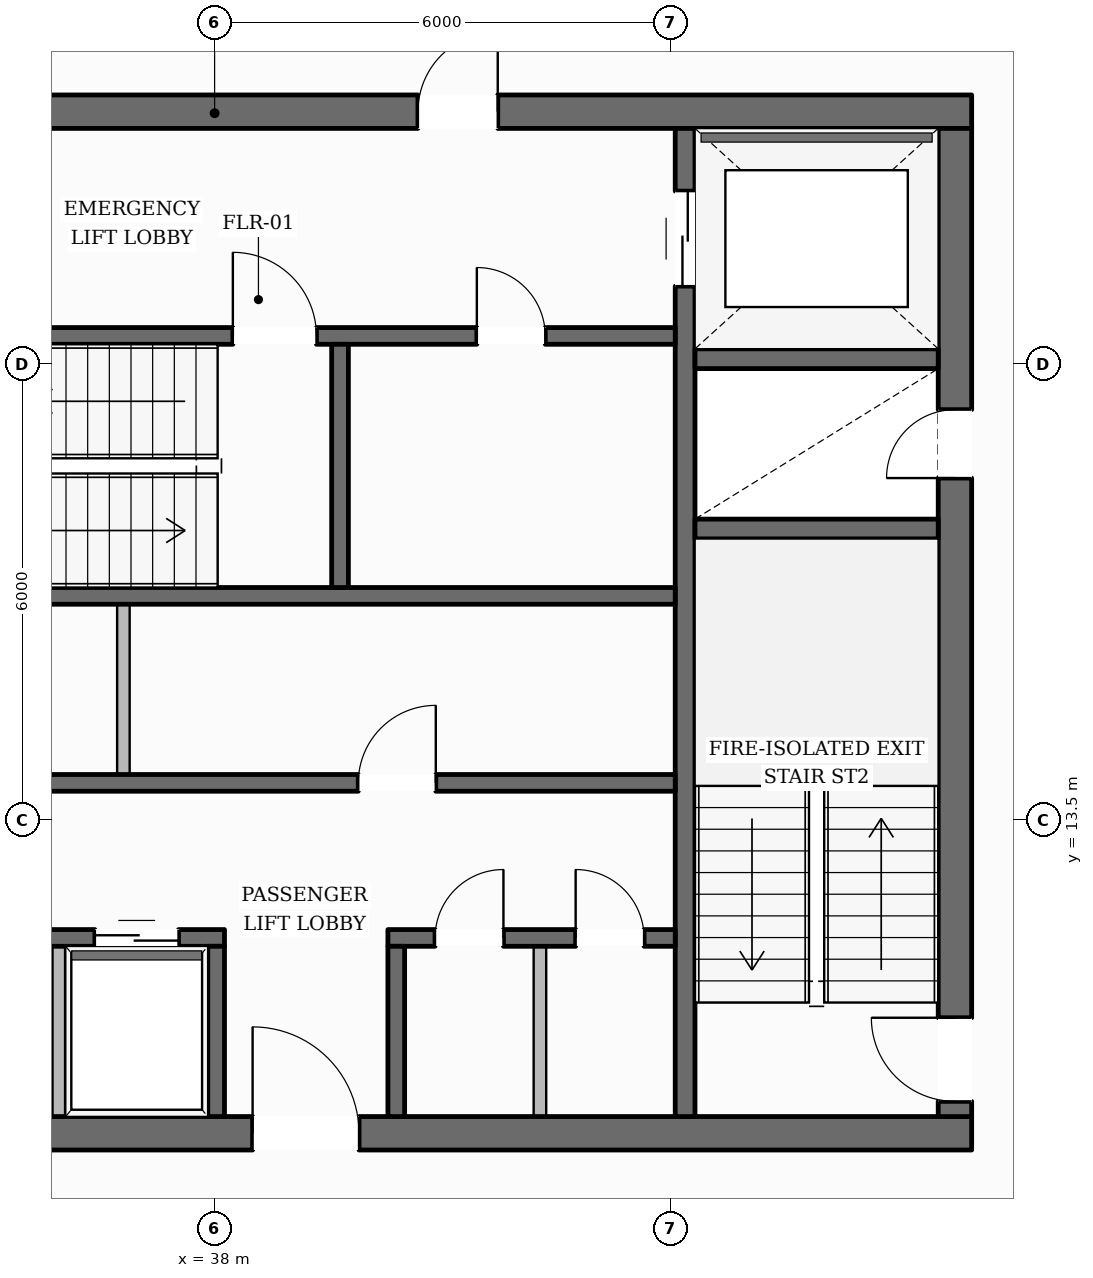
"""IFC4 building model, lengths in metres.
Left out: names, types, materials, properties, quantities, classifications, styles, units other than length and angle.
Written with IfcOpenShell. Run it as: python <this file> out.ifc"""

import sys

from ifc_helpers import new_model, si_unit, direction, frame, frame_2d, origin, place, context, subcontext, project, spatial, rectangle, extrude, element, fill, save


model = new_model("IFC4")
c1 = context("Model", 3, precision=1e-05, world=origin(), true_north=direction((0.0, 1.0)))
c2 = subcontext(c1, "Body", "Model", "MODEL_VIEW")
j1 = project(units=[si_unit("LENGTHUNIT", "METRE"), si_unit("PLANEANGLEUNIT", "RADIAN")], contexts=[c1])
p1 = place(None, origin())
s1 = spatial("IfcSite", under=j1, at=p1, CompositionType="ELEMENT")
p2 = place(p1, origin())
s2 = spatial("IfcBuilding", under=s1, at=p2, CompositionType="ELEMENT")
p3 = place(p2, frame((0.0, 0.0, 168.85)))
s3 = spatial("IfcBuildingStorey", under=s2, at=p3, CompositionType="ELEMENT", Elevation=168.85)
p4 = place(p3, frame((28.04, 9.38, 0.0), z_axis=(0.0, 0.0, 1.0), x_axis=(1.0, 0.0, 0.0)))
e1 = element("IfcWall", 1, at=p4, inside=s3, PredefinedType="SOLIDWALL", context=c2, shape_type="SweptSolid", body=[
    extrude(rectangle(XDim=19.92, YDim=0.44, at=frame_2d((9.96, 0.0))), origin(), (0.0, 0.0, 1.0), 3.6),
])
p5 = place(p4, frame((10.46, 0.0, 0.0)))
e2 = element("IfcOpeningElement", 2, at=p5, cuts=e1, PredefinedType="OPENING", context=c2, shape_type="SweptSolid", body=[
    extrude(rectangle(XDim=1.4, YDim=2.2, at=frame_2d((0.7, 1.1))), frame((0.0, 0.23, 0.0), z_axis=(0.0, -1.0, 0.0), x_axis=(1.0, 0.0, 0.0)), (0.0, 0.0, 1.0), 0.46),
])
p6 = place(p3, frame((28.04, 22.82, 0.0), z_axis=(0.0, 0.0, 1.0), x_axis=(1.0, 0.0, 0.0)))
e3 = element("IfcWall", 3, at=p6, inside=s3, PredefinedType="SOLIDWALL", context=c2, shape_type="SweptSolid", body=[
    extrude(rectangle(XDim=19.92, YDim=0.44, at=frame_2d((9.96, 0.0))), origin(), (0.0, 0.0, 1.0), 3.6),
])
p7 = place(p6, frame((6.235, 0.0, 0.0)))
e4 = element("IfcOpeningElement", 4, at=p7, cuts=e3, PredefinedType="OPENING", context=c2, shape_type="SweptSolid", body=[
    extrude(rectangle(XDim=1.05, YDim=2.15, at=frame_2d((0.525, 1.075))), frame((0.0, 0.23, 0.0), z_axis=(0.0, -1.0, 0.0), x_axis=(1.0, 0.0, 0.0)), (0.0, 0.0, 1.0), 0.46),
])
p8 = place(p6, frame((12.635, 0.0, 0.0)))
e5 = element("IfcOpeningElement", 5, at=p8, cuts=e3, PredefinedType="OPENING", context=c2, shape_type="SweptSolid", body=[
    extrude(rectangle(XDim=1.05, YDim=2.15, at=frame_2d((0.525, 1.075))), frame((0.0, 0.23, 0.0), z_axis=(0.0, -1.0, 0.0), x_axis=(1.0, 0.0, 0.0)), (0.0, 0.0, 1.0), 0.46),
])
p9 = place(p3, frame((47.74, 9.6, 0.0), z_axis=(0.0, 0.0, 1.0), x_axis=(0.0, 1.0, 0.0)))
e6 = element("IfcWall", 6, at=p9, inside=s3, PredefinedType="SOLIDWALL", context=c2, shape_type="SweptSolid", body=[
    extrude(rectangle(XDim=13.0, YDim=0.44, at=frame_2d((6.5, 0.0))), origin(), (0.0, 0.0, 1.0), 3.6),
])
p10 = place(p9, frame((0.2, 0.0, 0.0)))
e7 = element("IfcOpeningElement", 7, at=p10, cuts=e6, PredefinedType="OPENING", context=c2, shape_type="SweptSolid", body=[
    extrude(rectangle(XDim=1.1, YDim=2.15, at=frame_2d((0.55, 1.075))), frame((0.0, 0.23, 0.0), z_axis=(0.0, -1.0, 0.0), x_axis=(1.0, 0.0, 0.0)), (0.0, 0.0, 1.0), 0.46),
])
p11 = place(p9, frame((8.4, 0.0, 0.0)))
e8 = element("IfcOpeningElement", 8, at=p11, cuts=e6, PredefinedType="OPENING", context=c2, shape_type="SweptSolid", body=[
    extrude(rectangle(XDim=0.9, YDim=2.1, at=frame_2d((0.45, 1.05))), frame((0.0, 0.23, 0.0), z_axis=(0.0, -1.0, 0.0), x_axis=(1.0, 0.0, 0.0)), (0.0, 0.0, 1.0), 0.46),
])
p12 = place(p3, frame((44.19, 9.6, 0.0), z_axis=(0.0, 0.0, 1.0), x_axis=(0.0, 1.0, 0.0)))
e9 = element("IfcWall", 9, at=p12, inside=s3, PredefinedType="SHEAR", context=c2, shape_type="SweptSolid", body=[
    extrude(rectangle(XDim=13.0, YDim=0.26, at=frame_2d((6.5, 0.0))), origin(), (0.0, 0.0, 1.0), 3.6),
])
p13 = place(p12, frame((10.925, 0.0, 0.0)))
e10 = element("IfcOpeningElement", 10, at=p13, cuts=e9, PredefinedType="OPENING", context=c2, shape_type="SweptSolid", body=[
    extrude(rectangle(XDim=1.25, YDim=2.25, at=frame_2d((0.625, 1.125))), frame((0.0, 0.14, 0.0), z_axis=(0.0, -1.0, 0.0), x_axis=(1.0, 0.0, 0.0)), (0.0, 0.0, 1.0), 0.28),
])
for number, where, z_axis, x_axis in (
    (11, (44.32, 17.33, 0.0), (0.0, 0.0, 1.0), (1.0, 0.0, 0.0)),
    (12, (44.32, 19.57, 0.0), (0.0, 0.0, 1.0), (1.0, 0.0, 0.0)),
):
    element("IfcWall", number, at=place(p3, frame(where, z_axis=z_axis, x_axis=x_axis)), inside=s3, PredefinedType="SHEAR", context=c2, shape_type="SweptSolid", body=[
        extrude(rectangle(XDim=3.2, YDim=0.26, at=frame_2d((1.6, 0.0))), origin(), (0.0, 0.0, 1.0), 3.6),
    ])
p14 = place(p3, frame((31.94, 19.87, 0.0), z_axis=(0.0, 0.0, 1.0), x_axis=(1.0, 0.0, 0.0)))
e13 = element("IfcWall", 13, at=p14, inside=s3, PredefinedType="SOLIDWALL", context=c2, shape_type="SweptSolid", body=[
    extrude(rectangle(XDim=12.12, YDim=0.22, at=frame_2d((6.06, 0.0))), origin(), (0.0, 0.0, 1.0), 3.6),
])
p15 = place(p14, frame((6.3, 0.0, 0.0)))
e14 = element("IfcOpeningElement", 14, at=p15, cuts=e13, PredefinedType="OPENING", context=c2, shape_type="SweptSolid", body=[
    extrude(rectangle(XDim=1.1, YDim=2.15, at=frame_2d((0.55, 1.075))), frame((0.0, 0.12, 0.0), z_axis=(0.0, -1.0, 0.0), x_axis=(1.0, 0.0, 0.0)), (0.0, 0.0, 1.0), 0.24),
])
p16 = place(p14, frame((9.51, 0.0, 0.0)))
e15 = element("IfcOpeningElement", 15, at=p16, cuts=e13, PredefinedType="OPENING", context=c2, shape_type="SweptSolid", body=[
    extrude(rectangle(XDim=0.9, YDim=2.1, at=frame_2d((0.45, 1.05))), frame((0.0, 0.12, 0.0), z_axis=(0.0, -1.0, 0.0), x_axis=(1.0, 0.0, 0.0)), (0.0, 0.0, 1.0), 0.24),
])
p17 = place(p3, frame((31.94, 16.45, 0.0), z_axis=(0.0, 0.0, 1.0), x_axis=(1.0, 0.0, 0.0)))
e16 = element("IfcWall", 16, at=p17, inside=s3, PredefinedType="SOLIDWALL", context=c2, shape_type="SweptSolid", body=[
    extrude(rectangle(XDim=12.12, YDim=0.22, at=frame_2d((6.06, 0.0))), origin(), (0.0, 0.0, 1.0), 3.6),
])
p18 = place(p3, frame((39.65, 16.56, 0.0), z_axis=(0.0, 0.0, 1.0), x_axis=(0.0, 1.0, 0.0)))
e17 = element("IfcWall", 17, at=p18, inside=s3, PredefinedType="SOLIDWALL", context=c2, shape_type="SweptSolid", body=[
    extrude(rectangle(XDim=3.2, YDim=0.22, at=frame_2d((1.6, 0.0))), origin(), (0.0, 0.0, 1.0), 3.6),
])
p19 = place(p3, frame((31.94, 13.99, 0.0), z_axis=(0.0, 0.0, 1.0), x_axis=(1.0, 0.0, 0.0)))
e18 = element("IfcWall", 18, at=p19, inside=s3, PredefinedType="SOLIDWALL", context=c2, shape_type="SweptSolid", body=[
    extrude(rectangle(XDim=12.12, YDim=0.22, at=frame_2d((6.06, 0.0))), origin(), (0.0, 0.0, 1.0), 3.6),
])
p20 = place(p19, frame((1.91, 0.0, 0.0)))
e19 = element("IfcOpeningElement", 19, at=p20, cuts=e18, PredefinedType="OPENING", context=c2, shape_type="SweptSolid", body=[
    extrude(rectangle(XDim=0.9, YDim=2.1, at=frame_2d((0.45, 1.05))), frame((0.0, 0.12, 0.0), z_axis=(0.0, -1.0, 0.0), x_axis=(1.0, 0.0, 0.0)), (0.0, 0.0, 1.0), 0.24),
])
p21 = place(p19, frame((7.95, 0.0, 0.0)))
e20 = element("IfcOpeningElement", 20, at=p21, cuts=e18, PredefinedType="OPENING", context=c2, shape_type="SweptSolid", body=[
    extrude(rectangle(XDim=1.02, YDim=2.15, at=frame_2d((0.51, 1.075))), frame((0.0, 0.12, 0.0), z_axis=(0.0, -1.0, 0.0), x_axis=(1.0, 0.0, 0.0)), (0.0, 0.0, 1.0), 0.24),
])
p22 = place(p3, frame((31.94, 11.95, 0.0), z_axis=(0.0, 0.0, 1.0), x_axis=(1.0, 0.0, 0.0)))
e21 = element("IfcWall", 21, at=p22, inside=s3, PredefinedType="SOLIDWALL", context=c2, shape_type="SweptSolid", body=[
    extrude(rectangle(XDim=6.19, YDim=0.22, at=frame_2d((3.095, 0.0))), origin(), (0.0, 0.0, 1.0), 3.6),
])
p23 = place(p22, frame((0.385, 0.0, 0.0)))
e22 = element("IfcOpeningElement", 22, at=p23, cuts=e21, PredefinedType="OPENING", context=c2, shape_type="SweptSolid", body=[
    extrude(rectangle(XDim=1.1, YDim=2.2, at=frame_2d((0.55, 1.1))), frame((0.0, 0.12, 0.0), z_axis=(0.0, -1.0, 0.0), x_axis=(1.0, 0.0, 0.0)), (0.0, 0.0, 1.0), 0.24),
])
p24 = place(p22, frame((2.435, 0.0, 0.0)))
e23 = element("IfcOpeningElement", 23, at=p24, cuts=e21, PredefinedType="OPENING", context=c2, shape_type="SweptSolid", body=[
    extrude(rectangle(XDim=1.1, YDim=2.2, at=frame_2d((0.55, 1.1))), frame((0.0, 0.12, 0.0), z_axis=(0.0, -1.0, 0.0), x_axis=(1.0, 0.0, 0.0)), (0.0, 0.0, 1.0), 0.24),
])
p25 = place(p22, frame((4.485, 0.0, 0.0)))
e24 = element("IfcOpeningElement", 24, at=p25, cuts=e21, PredefinedType="OPENING", context=c2, shape_type="SweptSolid", body=[
    extrude(rectangle(XDim=1.1, YDim=2.2, at=frame_2d((0.55, 1.1))), frame((0.0, 0.12, 0.0), z_axis=(0.0, -1.0, 0.0), x_axis=(1.0, 0.0, 0.0)), (0.0, 0.0, 1.0), 0.24),
])
p26 = place(p3, frame((40.28, 11.95, 0.0), z_axis=(0.0, 0.0, 1.0), x_axis=(1.0, 0.0, 0.0)))
e25 = element("IfcWall", 25, at=p26, inside=s3, PredefinedType="SOLIDWALL", context=c2, shape_type="SweptSolid", body=[
    extrude(rectangle(XDim=3.78, YDim=0.22, at=frame_2d((1.89, 0.0))), origin(), (0.0, 0.0, 1.0), 3.6),
])
p27 = place(p26, frame((0.62, 0.0, 0.0)))
e26 = element("IfcOpeningElement", 26, at=p27, cuts=e25, PredefinedType="OPENING", context=c2, shape_type="SweptSolid", body=[
    extrude(rectangle(XDim=0.9, YDim=2.1, at=frame_2d((0.45, 1.05))), frame((0.0, 0.12, 0.0), z_axis=(0.0, -1.0, 0.0), x_axis=(1.0, 0.0, 0.0)), (0.0, 0.0, 1.0), 0.24),
])
p28 = place(p26, frame((2.47, 0.0, 0.0)))
e27 = element("IfcOpeningElement", 27, at=p28, cuts=e25, PredefinedType="OPENING", context=c2, shape_type="SweptSolid", body=[
    extrude(rectangle(XDim=0.9, YDim=2.1, at=frame_2d((0.45, 1.05))), frame((0.0, 0.12, 0.0), z_axis=(0.0, -1.0, 0.0), x_axis=(1.0, 0.0, 0.0)), (0.0, 0.0, 1.0), 0.24),
])
for number, where, z_axis, x_axis in (
    (28, (38.02, 9.6, 0.0), (0.0, 0.0, 1.0), (0.0, 1.0, 0.0)),
    (29, (40.39, 9.6, 0.0), (0.0, 0.0, 1.0), (0.0, 1.0, 0.0)),
):
    element("IfcWall", number, at=place(p3, frame(where, z_axis=z_axis, x_axis=x_axis)), inside=s3, PredefinedType="SOLIDWALL", context=c2, shape_type="SweptSolid", body=[
        extrude(rectangle(XDim=2.24, YDim=0.22, at=frame_2d((1.12, 0.0))), origin(), (0.0, 0.0, 1.0), 3.6),
    ])
p29 = place(p3, frame((42.696, 44.593, 0.0), z_axis=(0.0, 0.0, 1.0), x_axis=(0.495321099056, -0.868709968188, 0.0)))
e30 = element("IfcWall", 30, at=p29, inside=s3, PredefinedType="STANDARD", context=c2, shape_type="SweptSolid", body=[
    extrude(rectangle(XDim=37.366, YDim=0.35, at=frame_2d((18.683, 0.0))), origin(), (0.0, 0.0, 1.0), 3.132),
])
p30 = place(p29, frame((33.134, 0.0, 0.65)))
e31 = element("IfcOpeningElement", 31, at=p30, cuts=e30, PredefinedType="OPENING", context=c2, shape_type="SweptSolid", body=[
    extrude(rectangle(XDim=1.45, YDim=1.75, at=frame_2d((0.725, 0.875))), frame((0.0, 0.185, 0.0), z_axis=(0.0, -1.0, 0.0), x_axis=(1.0, 0.0, 0.0)), (0.0, 0.0, 1.0), 0.37),
])
p31 = place(p29, frame((27.065, 0.0, 0.65)))
e32 = element("IfcOpeningElement", 32, at=p31, cuts=e30, PredefinedType="OPENING", context=c2, shape_type="SweptSolid", body=[
    extrude(rectangle(XDim=1.45, YDim=1.75, at=frame_2d((0.725, 0.875))), frame((0.0, 0.185, 0.0), z_axis=(0.0, -1.0, 0.0), x_axis=(1.0, 0.0, 0.0)), (0.0, 0.0, 1.0), 0.37),
])
p32 = place(p29, frame((20.995, 0.0, 0.65)))
e33 = element("IfcOpeningElement", 33, at=p32, cuts=e30, PredefinedType="OPENING", context=c2, shape_type="SweptSolid", body=[
    extrude(rectangle(XDim=1.45, YDim=1.75, at=frame_2d((0.725, 0.875))), frame((0.0, 0.185, 0.0), z_axis=(0.0, -1.0, 0.0), x_axis=(1.0, 0.0, 0.0)), (0.0, 0.0, 1.0), 0.37),
])
p33 = place(p29, frame((8.857, 0.0, 0.65)))
e34 = element("IfcOpeningElement", 34, at=p33, cuts=e30, PredefinedType="OPENING", context=c2, shape_type="SweptSolid", body=[
    extrude(rectangle(XDim=1.45, YDim=1.75, at=frame_2d((0.725, 0.875))), frame((0.0, 0.185, 0.0), z_axis=(0.0, -1.0, 0.0), x_axis=(1.0, 0.0, 0.0)), (0.0, 0.0, 1.0), 0.37),
])
p34 = place(p29, frame((2.787, 0.0, 0.65)))
e35 = element("IfcOpeningElement", 35, at=p34, cuts=e30, PredefinedType="OPENING", context=c2, shape_type="SweptSolid", body=[
    extrude(rectangle(XDim=1.45, YDim=1.75, at=frame_2d((0.725, 0.875))), frame((0.0, 0.185, 0.0), z_axis=(0.0, -1.0, 0.0), x_axis=(1.0, 0.0, 0.0)), (0.0, 0.0, 1.0), 0.37),
])
p35 = place(p3, frame((35.95, 9.52, 0.0), z_axis=(0.0, 0.0, 1.0), x_axis=(0.0, 1.0, 0.0)))
e36 = element("IfcWall", 36, at=p35, inside=s3, PredefinedType="PARTITIONING", context=c2, shape_type="SweptSolid", body=[
    extrude(rectangle(XDim=2.32, YDim=0.165, at=frame_2d((1.16, 0.0))), origin(), (0.0, 0.0, 1.0), 3.6),
])
p36 = place(p3, frame((36.8, 14.1, 0.0), z_axis=(0.0, 0.0, 1.0), x_axis=(0.0, 1.0, 0.0)))
e37 = element("IfcWall", 37, at=p36, inside=s3, PredefinedType="PARTITIONING", context=c2, shape_type="SweptSolid", body=[
    extrude(rectangle(XDim=2.24, YDim=0.165, at=frame_2d((1.12, 0.0))), origin(), (0.0, 0.0, 1.0), 3.6),
])
p37 = place(p3, frame((42.28, 9.52, 0.0), z_axis=(0.0, 0.0, 1.0), x_axis=(0.0, 1.0, 0.0)))
e38 = element("IfcWall", 38, at=p37, inside=s3, PredefinedType="PARTITIONING", context=c2, shape_type="SweptSolid", body=[
    extrude(rectangle(XDim=2.32, YDim=0.165, at=frame_2d((1.16, 0.0))), origin(), (0.0, 0.0, 1.0), 3.6),
])
p38 = place(p10, origin())
e39 = element("IfcDoor", 39, at=p38, inside=s3, OperationType="SINGLE_SWING_RIGHT", PredefinedType="DOOR", context=c2, shape_type="SweptSolid", body=[
    extrude(rectangle(XDim=1.1, YDim=2.15, at=frame_2d((0.55, 1.075))), frame((0.0, 0.025, 0.0), z_axis=(0.0, -1.0, 0.0), x_axis=(1.0, 0.0, 0.0)), (0.0, 0.0, 1.0), 0.05),
])
fill(e7, e39)
p39 = place(p15, origin())
e40 = element("IfcDoor", 40, at=p39, inside=s3, OperationType="SINGLE_SWING_LEFT", PredefinedType="DOOR", context=c2, shape_type="SweptSolid", body=[
    extrude(rectangle(XDim=1.1, YDim=2.15, at=frame_2d((0.55, 1.075))), frame((0.0, 0.025, 0.0), z_axis=(0.0, -1.0, 0.0), x_axis=(1.0, 0.0, 0.0)), (0.0, 0.0, 1.0), 0.05),
])
fill(e14, e40)
p40 = place(p11, origin())
e41 = element("IfcDoor", 41, at=p40, inside=s3, OperationType="SINGLE_SWING_LEFT", PredefinedType="DOOR", context=c2, shape_type="SweptSolid", body=[
    extrude(rectangle(XDim=0.9, YDim=2.1, at=frame_2d((0.45, 1.05))), frame((0.0, 0.025, 0.0), z_axis=(0.0, -1.0, 0.0), x_axis=(1.0, 0.0, 0.0)), (0.0, 0.0, 1.0), 0.05),
])
fill(e8, e41)
p41 = place(p8, origin())
e42 = element("IfcDoor", 42, at=p41, inside=s3, OperationType="SINGLE_SWING_RIGHT", PredefinedType="DOOR", context=c2, shape_type="SweptSolid", body=[
    extrude(rectangle(XDim=1.05, YDim=2.15, at=frame_2d((0.525, 1.075))), frame((0.0, 0.025, 0.0), z_axis=(0.0, -1.0, 0.0), x_axis=(1.0, 0.0, 0.0)), (0.0, 0.0, 1.0), 0.05),
])
fill(e5, e42)
p42 = place(p13, origin())
e43 = element("IfcDoor", 43, at=p42, inside=s3, OperationType="DOUBLE_DOOR_SLIDING", PredefinedType="DOOR", context=c2, shape_type="SweptSolid", body=[
    extrude(rectangle(XDim=1.25, YDim=2.25, at=frame_2d((0.625, 1.125))), frame((0.0, 0.025, 0.0), z_axis=(0.0, -1.0, 0.0), x_axis=(1.0, 0.0, 0.0)), (0.0, 0.0, 1.0), 0.05),
])
fill(e10, e43)
p43 = place(p5, origin())
e44 = element("IfcDoor", 44, at=p43, inside=s3, OperationType="SINGLE_SWING_LEFT", PredefinedType="DOOR", context=c2, shape_type="SweptSolid", body=[
    extrude(rectangle(XDim=1.4, YDim=2.2, at=frame_2d((0.7, 1.1))), frame((0.0, 0.025, 0.0), z_axis=(0.0, -1.0, 0.0), x_axis=(1.0, 0.0, 0.0)), (0.0, 0.0, 1.0), 0.05),
])
fill(e2, e44)
p44 = place(p25, origin())
e45 = element("IfcDoor", 45, at=p44, inside=s3, OperationType="DOUBLE_DOOR_SLIDING", PredefinedType="DOOR", context=c2, shape_type="SweptSolid", body=[
    extrude(rectangle(XDim=1.1, YDim=2.2, at=frame_2d((0.55, 1.1))), frame((0.0, 0.025, 0.0), z_axis=(0.0, -1.0, 0.0), x_axis=(1.0, 0.0, 0.0)), (0.0, 0.0, 1.0), 0.05),
])
fill(e24, e45)
p45 = place(p21, origin())
e46 = element("IfcDoor", 46, at=p45, inside=s3, OperationType="SINGLE_SWING_RIGHT", PredefinedType="DOOR", context=c2, shape_type="SweptSolid", body=[
    extrude(rectangle(XDim=1.02, YDim=2.15, at=frame_2d((0.51, 1.075))), frame((0.0, 0.025, 0.0), z_axis=(0.0, -1.0, 0.0), x_axis=(1.0, 0.0, 0.0)), (0.0, 0.0, 1.0), 0.05),
])
fill(e20, e46)
p46 = place(p16, origin())
e47 = element("IfcDoor", 47, at=p46, inside=s3, OperationType="SINGLE_SWING_LEFT", PredefinedType="DOOR", context=c2, shape_type="SweptSolid", body=[
    extrude(rectangle(XDim=0.9, YDim=2.1, at=frame_2d((0.45, 1.05))), frame((0.0, 0.025, 0.0), z_axis=(0.0, -1.0, 0.0), x_axis=(1.0, 0.0, 0.0)), (0.0, 0.0, 1.0), 0.05),
])
fill(e15, e47)
p47 = place(p27, origin())
e48 = element("IfcDoor", 48, at=p47, inside=s3, OperationType="SINGLE_SWING_RIGHT", PredefinedType="DOOR", context=c2, shape_type="SweptSolid", body=[
    extrude(rectangle(XDim=0.9, YDim=2.1, at=frame_2d((0.45, 1.05))), frame((0.0, 0.025, 0.0), z_axis=(0.0, -1.0, 0.0), x_axis=(1.0, 0.0, 0.0)), (0.0, 0.0, 1.0), 0.05),
])
fill(e26, e48)
p48 = place(p28, origin())
e49 = element("IfcDoor", 49, at=p48, inside=s3, OperationType="SINGLE_SWING_LEFT", PredefinedType="DOOR", context=c2, shape_type="SweptSolid", body=[
    extrude(rectangle(XDim=0.9, YDim=2.1, at=frame_2d((0.45, 1.05))), frame((0.0, 0.025, 0.0), z_axis=(0.0, -1.0, 0.0), x_axis=(1.0, 0.0, 0.0)), (0.0, 0.0, 1.0), 0.05),
])
fill(e27, e49)
save(model, sys.argv[1])
